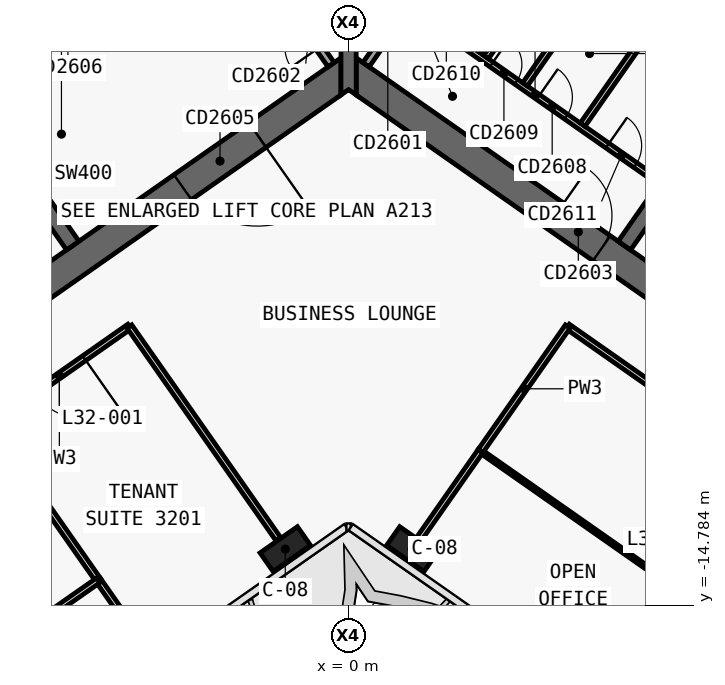
"""IFC4 building model, lengths in metres.
Left out: names, types, materials, properties, quantities, classifications, styles, units other than length and angle.
Written with IfcOpenShell. Run it as: python <this file> out.ifc"""

import sys

from ifc_helpers import new_model, si_unit, direction, frame, frame_2d, origin, origin_2d, place, context, subcontext, project, spatial, polyline, rectangle, outline, extrude, element, fill, save


model = new_model("IFC4")
c1 = context("Model", 3, precision=1e-05, world=origin(), true_north=direction((0.0, 1.0)))
c2 = subcontext(c1, "Body", "Model", "MODEL_VIEW")
j1 = project(units=[si_unit("LENGTHUNIT", "METRE"), si_unit("PLANEANGLEUNIT", "RADIAN")], contexts=[c1])
p1 = place(None, origin())
s1 = spatial("IfcSite", under=j1, at=p1, CompositionType="ELEMENT")
p2 = place(p1, origin())
s2 = spatial("IfcBuilding", under=s1, at=p2, CompositionType="ELEMENT")
p3 = place(p2, frame((0.0, 0.0, 143.7)))
s3 = spatial("IfcBuildingStorey", under=s2, at=p3, CompositionType="ELEMENT", Elevation=143.7)
p4 = place(p3, frame((0.029, 11.984, 0.0), z_axis=(0.0, 0.0, 1.0), x_axis=(-0.819151382952, -0.573577380837, 0.0)))
e1 = element("IfcWall", 1, at=p4, inside=s3, PredefinedType="SHEAR", context=c2, shape_type="SweptSolid", body=[
    extrude(outline(polyline([(33.898, 0.4), (0.56, 0.4), (-0.0, -0.4), (33.898, -0.4), (33.898, 0.4)])), origin(), (0.0, 0.0, 1.0), 3.9),
])
p5 = place(p3, frame((0.029, -0.712, 0.0), z_axis=(0.0, 0.0, 1.0), x_axis=(-0.819151758019, -0.573576845187, 0.0)))
e2 = element("IfcWall", 2, at=p5, inside=s3, PredefinedType="SHEAR", context=c2, shape_type="SweptSolid", body=[
    extrude(outline(polyline([(26.616, 0.4), (0.56, 0.4), (-0.0, -0.4), (26.616, -0.4), (26.616, 0.4)])), origin(), (0.0, 0.0, 1.0), 3.9),
])
p6 = place(p5, frame((2.966, 0.0, 0.0)))
e3 = element("IfcOpeningElement", 3, at=p6, cuts=e2, PredefinedType="OPENING", context=c2, shape_type="SweptSolid", body=[
    extrude(rectangle(XDim=2.4, YDim=2.1, at=frame_2d((1.2, 1.05))), frame((0.0, 0.41, 0.0), z_axis=(0.0, -1.0, 0.0), x_axis=(1.0, 0.0, 0.0)), (0.0, 0.0, 1.0), 0.82),
])
p7 = place(p5, frame((11.916, 0.0, 0.0)))
e4 = element("IfcOpeningElement", 4, at=p7, cuts=e2, PredefinedType="OPENING", context=c2, shape_type="SweptSolid", body=[
    extrude(rectangle(XDim=2.4, YDim=2.1, at=frame_2d((1.2, 1.05))), frame((0.0, 0.41, 0.0), z_axis=(0.0, -1.0, 0.0), x_axis=(1.0, 0.0, 0.0)), (0.0, 0.0, 1.0), 0.82),
])
p8 = place(p3, frame((-7.258, -5.326, 0.0), z_axis=(0.0, 0.0, 1.0), x_axis=(-0.573540709186, 0.819177059558, 0.0)))
e5 = element("IfcWall", 5, at=p8, inside=s3, PredefinedType="SHEAR", context=c2, shape_type="SweptSolid", body=[
    extrude(outline(polyline([(4.6, 0.2), (-0.0, 0.2), (-0.0, -0.2), (4.6, -0.2), (4.6, 0.2)])), origin(), (0.0, 0.0, 1.0), 3.9),
])
p9 = place(p3, frame((-2.638, 3.768, 0.0), z_axis=(0.0, 0.0, 1.0), x_axis=(-0.81915267502, -0.573575535572, 0.0)))
e6 = element("IfcWall", 6, at=p9, inside=s3, PredefinedType="SHEAR", context=c2, shape_type="SweptSolid", body=[
    extrude(outline(polyline([(26.2, 0.2), (0.0, 0.2), (0.0, -0.2), (26.2, -0.2), (26.2, 0.2)])), origin(), (0.0, 0.0, 1.0), 3.9),
])
p10 = place(p9, frame((1.169, 0.0, 0.0)))
e7 = element("IfcOpeningElement", 7, at=p10, cuts=e6, PredefinedType="OPENING", context=c2, shape_type="SweptSolid", body=[
    extrude(rectangle(XDim=1.1, YDim=2.1, at=frame_2d((0.55, 1.05))), frame((0.0, 0.21, 0.0), z_axis=(0.0, -1.0, 0.0), x_axis=(1.0, 0.0, 0.0)), (0.0, 0.0, 1.0), 0.42),
])
p11 = place(p9, frame((3.206, 0.0, 0.0)))
e8 = element("IfcOpeningElement", 8, at=p11, cuts=e6, PredefinedType="OPENING", context=c2, shape_type="SweptSolid", body=[
    extrude(rectangle(XDim=1.1, YDim=2.1, at=frame_2d((0.55, 1.05))), frame((0.0, 0.21, 0.0), z_axis=(0.0, -1.0, 0.0), x_axis=(1.0, 0.0, 0.0)), (0.0, 0.0, 1.0), 0.42),
])
p12 = place(p9, frame((5.244, 0.0, 0.0)))
e9 = element("IfcOpeningElement", 9, at=p12, cuts=e6, PredefinedType="OPENING", context=c2, shape_type="SweptSolid", body=[
    extrude(rectangle(XDim=1.1, YDim=2.1, at=frame_2d((0.55, 1.05))), frame((0.0, 0.21, 0.0), z_axis=(0.0, -1.0, 0.0), x_axis=(1.0, 0.0, 0.0)), (0.0, 0.0, 1.0), 0.42),
])
p13 = place(p9, frame((7.281, 0.0, 0.0)))
e10 = element("IfcOpeningElement", 10, at=p13, cuts=e6, PredefinedType="OPENING", context=c2, shape_type="SweptSolid", body=[
    extrude(rectangle(XDim=1.1, YDim=2.1, at=frame_2d((0.55, 1.05))), frame((0.0, 0.21, 0.0), z_axis=(0.0, -1.0, 0.0), x_axis=(1.0, 0.0, 0.0)), (0.0, 0.0, 1.0), 0.42),
])
p14 = place(p9, frame((9.688, 0.0, 0.0)))
e11 = element("IfcOpeningElement", 11, at=p14, cuts=e6, PredefinedType="OPENING", context=c2, shape_type="SweptSolid", body=[
    extrude(rectangle(XDim=1.1, YDim=2.1, at=frame_2d((0.55, 1.05))), frame((0.0, 0.21, 0.0), z_axis=(0.0, -1.0, 0.0), x_axis=(1.0, 0.0, 0.0)), (0.0, 0.0, 1.0), 0.42),
])
p15 = place(p9, frame((11.863, 0.0, 0.0)))
e12 = element("IfcOpeningElement", 12, at=p15, cuts=e6, PredefinedType="OPENING", context=c2, shape_type="SweptSolid", body=[
    extrude(rectangle(XDim=1.1, YDim=2.1, at=frame_2d((0.55, 1.05))), frame((0.0, 0.21, 0.0), z_axis=(0.0, -1.0, 0.0), x_axis=(1.0, 0.0, 0.0)), (0.0, 0.0, 1.0), 0.42),
])
p16 = place(p9, frame((14.038, 0.0, 0.0)))
e13 = element("IfcOpeningElement", 13, at=p16, cuts=e6, PredefinedType="OPENING", context=c2, shape_type="SweptSolid", body=[
    extrude(rectangle(XDim=1.1, YDim=2.1, at=frame_2d((0.55, 1.05))), frame((0.0, 0.21, 0.0), z_axis=(0.0, -1.0, 0.0), x_axis=(1.0, 0.0, 0.0)), (0.0, 0.0, 1.0), 0.42),
])
p17 = place(p9, frame((16.212, 0.0, 0.0)))
e14 = element("IfcOpeningElement", 14, at=p17, cuts=e6, PredefinedType="OPENING", context=c2, shape_type="SweptSolid", body=[
    extrude(rectangle(XDim=1.1, YDim=2.1, at=frame_2d((0.55, 1.05))), frame((0.0, 0.21, 0.0), z_axis=(0.0, -1.0, 0.0), x_axis=(1.0, 0.0, 0.0)), (0.0, 0.0, 1.0), 0.42),
])
p18 = place(p3, frame((-0.029, 11.984, 0.0), z_axis=(0.0, 0.0, 1.0), x_axis=(0.819151382952, -0.573577380837, 0.0)))
e15 = element("IfcWall", 15, at=p18, inside=s3, PredefinedType="SHEAR", context=c2, shape_type="SweptSolid", body=[
    extrude(outline(polyline([(33.898, 0.4), (-0.0, 0.4), (0.56, -0.4), (33.898, -0.4), (33.898, 0.4)])), origin(), (0.0, 0.0, 1.0), 3.9),
])
p19 = place(p3, frame((-0.029, -0.712, 0.0), z_axis=(0.0, 0.0, 1.0), x_axis=(0.819151758019, -0.573576845187, 0.0)))
e16 = element("IfcWall", 16, at=p19, inside=s3, PredefinedType="SHEAR", context=c2, shape_type="SweptSolid", body=[
    extrude(outline(polyline([(26.616, 0.4), (-0.0, 0.4), (0.56, -0.4), (26.616, -0.4), (26.616, 0.4)])), origin(), (0.0, 0.0, 1.0), 3.9),
])
p20 = place(p19, frame((6.666, 0.0, 0.0)))
e17 = element("IfcOpeningElement", 17, at=p20, cuts=e16, PredefinedType="OPENING", context=c2, shape_type="SweptSolid", body=[
    extrude(rectangle(XDim=1.5, YDim=2.1, at=frame_2d((0.75, 1.05))), frame((0.0, 0.41, 0.0), z_axis=(0.0, -1.0, 0.0), x_axis=(1.0, 0.0, 0.0)), (0.0, 0.0, 1.0), 0.82),
])
p21 = place(p19, frame((12.366, 0.0, 0.0)))
e18 = element("IfcOpeningElement", 18, at=p21, cuts=e16, PredefinedType="OPENING", context=c2, shape_type="SweptSolid", body=[
    extrude(rectangle(XDim=1.5, YDim=2.1, at=frame_2d((0.75, 1.05))), frame((0.0, 0.41, 0.0), z_axis=(0.0, -1.0, 0.0), x_axis=(1.0, 0.0, 0.0)), (0.0, 0.0, 1.0), 0.82),
])
p22 = place(p3, frame((7.258, -5.326, 0.0), z_axis=(0.0, 0.0, 1.0), x_axis=(0.573540709186, 0.819177059558, 0.0)))
e19 = element("IfcWall", 19, at=p22, inside=s3, PredefinedType="SHEAR", context=c2, shape_type="SweptSolid", body=[
    extrude(outline(polyline([(-0.0, 0.2), (-0.0, -0.2), (4.6, -0.2), (4.6, 0.2), (-0.0, 0.2)])), origin(), (0.0, 0.0, 1.0), 3.9),
])
p23 = place(p3, frame((2.638, 3.768, 0.0), z_axis=(0.0, 0.0, 1.0), x_axis=(0.81915267502, -0.573575535572, 0.0)))
e20 = element("IfcWall", 20, at=p23, inside=s3, PredefinedType="SHEAR", context=c2, shape_type="SweptSolid", body=[
    extrude(outline(polyline([(0.0, 0.2), (0.0, -0.2), (26.2, -0.2), (26.2, 0.2), (0.0, 0.2)])), origin(), (0.0, 0.0, 1.0), 3.9),
])
p24 = place(p23, frame((9.637, 0.0, 0.0)))
e21 = element("IfcOpeningElement", 21, at=p24, cuts=e20, PredefinedType="OPENING", context=c2, shape_type="SweptSolid", body=[
    extrude(rectangle(XDim=1.2, YDim=2.1, at=frame_2d((0.6, 1.05))), frame((0.0, 0.21, 0.0), z_axis=(0.0, -1.0, 0.0), x_axis=(1.0, 0.0, 0.0)), (0.0, 0.0, 1.0), 0.42),
])
p25 = place(p23, frame((11.812, 0.0, 0.0)))
e22 = element("IfcOpeningElement", 22, at=p25, cuts=e20, PredefinedType="OPENING", context=c2, shape_type="SweptSolid", body=[
    extrude(rectangle(XDim=1.2, YDim=2.1, at=frame_2d((0.6, 1.05))), frame((0.0, 0.21, 0.0), z_axis=(0.0, -1.0, 0.0), x_axis=(1.0, 0.0, 0.0)), (0.0, 0.0, 1.0), 0.42),
])
p26 = place(p23, frame((13.988, 0.0, 0.0)))
e23 = element("IfcOpeningElement", 23, at=p26, cuts=e20, PredefinedType="OPENING", context=c2, shape_type="SweptSolid", body=[
    extrude(rectangle(XDim=1.2, YDim=2.1, at=frame_2d((0.6, 1.05))), frame((0.0, 0.21, 0.0), z_axis=(0.0, -1.0, 0.0), x_axis=(1.0, 0.0, 0.0)), (0.0, 0.0, 1.0), 0.42),
])
p27 = place(p23, frame((16.262, 0.0, 0.0)))
e24 = element("IfcOpeningElement", 24, at=p27, cuts=e20, PredefinedType="OPENING", context=c2, shape_type="SweptSolid", body=[
    extrude(rectangle(XDim=1.0, YDim=2.1, at=frame_2d((0.5, 1.05))), frame((0.0, 0.21, 0.0), z_axis=(0.0, -1.0, 0.0), x_axis=(1.0, 0.0, 0.0)), (0.0, 0.0, 1.0), 0.42),
])
p28 = place(p3, frame((0.0, -1.361, 0.0), z_axis=(0.0, 0.0, 1.0), x_axis=(0.0, 1.0, 0.0)))
e25 = element("IfcWall", 25, at=p28, inside=s3, PredefinedType="SHEAR", context=c2, shape_type="SweptSolid", body=[
    extrude(outline(polyline([(0.0, -0.2), (0.14, -0.2), (1.075, -0.2), (12.696, -0.2), (13.813, -0.2), (13.893, -0.2), (13.933, -0.172), (13.813, 0.0), (13.933, 0.172), (13.893, 0.2), (13.813, 0.2), (12.696, 0.2), (1.075, 0.2), (0.14, 0.2), (0.0, 0.2), (0.14, 0.0), (0.0, -0.2)])), origin(), (0.0, 0.0, 1.0), 3.9),
])
for number, where, z_axis, x_axis in (
    (26, (-1.665, -13.313, 0.0), (0.0, 0.0, 1.0), (-0.819, -0.574, 0.0)),
    (27, (1.665, -13.313, 0.0), (0.0, 0.0, 1.0), (0.819, -0.574, 0.0)),
):
    element("IfcColumn", number, at=place(p3, frame(where, z_axis=z_axis, x_axis=x_axis)), inside=s3, PredefinedType="COLUMN", context=c2, shape_type="SweptSolid", body=[
        extrude(rectangle(XDim=1.2, YDim=0.6, at=origin_2d()), origin(), (0.0, 0.0, 1.0), 3.9),
    ])
p29 = place(p3, frame((1.63, 0.934, 0.0), z_axis=(0.0, 0.0, 1.0), x_axis=(0.819165963305, -0.573556557423, 0.0)))
e28 = element("IfcWall", 28, at=p29, inside=s3, PredefinedType="PARTITIONING", context=c2, shape_type="SweptSolid", body=[
    extrude(rectangle(XDim=8.0, YDim=0.15, at=frame_2d((4.0, 0.0))), origin(), (0.0, 0.0, 1.0), 3.62),
])
p30 = place(p29, frame((0.7, 0.0, 0.0)))
e29 = element("IfcOpeningElement", 29, at=p30, cuts=e28, PredefinedType="OPENING", context=c2, shape_type="SweptSolid", body=[
    extrude(rectangle(XDim=0.9, YDim=2.1, at=frame_2d((0.45, 1.05))), frame((0.0, 0.085, 0.0), z_axis=(0.0, -1.0, 0.0), x_axis=(1.0, 0.0, 0.0)), (0.0, 0.0, 1.0), 0.17),
])
p31 = place(p29, frame((2.6, 0.0, 0.0)))
e30 = element("IfcOpeningElement", 30, at=p31, cuts=e28, PredefinedType="OPENING", context=c2, shape_type="SweptSolid", body=[
    extrude(rectangle(XDim=0.8, YDim=2.1, at=frame_2d((0.4, 1.05))), frame((0.0, 0.085, 0.0), z_axis=(0.0, -1.0, 0.0), x_axis=(1.0, 0.0, 0.0)), (0.0, 0.0, 1.0), 0.17),
])
p32 = place(p29, frame((4.1, 0.0, 0.0)))
e31 = element("IfcOpeningElement", 31, at=p32, cuts=e28, PredefinedType="OPENING", context=c2, shape_type="SweptSolid", body=[
    extrude(rectangle(XDim=0.9, YDim=2.1, at=frame_2d((0.45, 1.05))), frame((0.0, 0.085, 0.0), z_axis=(0.0, -1.0, 0.0), x_axis=(1.0, 0.0, 0.0)), (0.0, 0.0, 1.0), 0.17),
])
p33 = place(p29, frame((6.325, 0.0, 0.0)))
e32 = element("IfcOpeningElement", 32, at=p33, cuts=e28, PredefinedType="OPENING", context=c2, shape_type="SweptSolid", body=[
    extrude(rectangle(XDim=0.9, YDim=2.1, at=frame_2d((0.45, 1.05))), frame((0.0, 0.085, 0.0), z_axis=(0.0, -1.0, 0.0), x_axis=(1.0, 0.0, 0.0)), (0.0, 0.0, 1.0), 0.17),
])
for number, where, z_axis, x_axis in (
    (33, (3.619, -0.367, 0.0), (0.0, 0.0, 1.0), (0.574, 0.819, 0.0)),
    (34, (4.643, -1.084, 0.0), (0.0, 0.0, 1.0), (0.574, 0.819, 0.0)),
    (35, (6.158, -2.145, 0.0), (0.0, 0.0, 1.0), (0.574, 0.819, 0.0)),
):
    element("IfcWall", number, at=place(p3, frame(where, z_axis=z_axis, x_axis=x_axis)), inside=s3, PredefinedType="PARTITIONING", context=c2, shape_type="SweptSolid", body=[
        extrude(rectangle(XDim=2.625, YDim=0.15, at=frame_2d((1.312, 0.0))), origin(), (0.0, 0.0, 1.0), 3.62),
    ])
p34 = place(p3, frame((-0.459, -0.565, 0.0), z_axis=(0.0, 0.0, 1.0), x_axis=(-0.573576324356, 0.819152122709, 0.0)))
e36 = element("IfcWall", 36, at=p34, inside=s3, PredefinedType="SOLIDWALL", context=c2, shape_type="SweptSolid", body=[
    extrude(rectangle(XDim=4.6, YDim=0.2, at=frame_2d((2.3, 0.0))), origin(), (0.0, 0.0, 1.0), 3.62),
])
p35 = place(p34, frame((0.55, 0.0, 0.0)))
e37 = element("IfcOpeningElement", 37, at=p35, cuts=e36, PredefinedType="OPENING", context=c2, shape_type="SweptSolid", body=[
    extrude(rectangle(XDim=0.9, YDim=2.1, at=frame_2d((0.45, 1.05))), frame((0.0, 0.11, 0.0), z_axis=(0.0, -1.0, 0.0), x_axis=(1.0, 0.0, 0.0)), (0.0, 0.0, 1.0), 0.22),
])
p36 = place(p3, frame((0.459, -0.565, 0.0), z_axis=(0.0, 0.0, 1.0), x_axis=(0.573576324356, 0.819152122709, 0.0)))
e38 = element("IfcWall", 38, at=p36, inside=s3, PredefinedType="SOLIDWALL", context=c2, shape_type="SweptSolid", body=[
    extrude(rectangle(XDim=4.6, YDim=0.2, at=frame_2d((2.3, 0.0))), origin(), (0.0, 0.0, 1.0), 3.62),
])
p37 = place(p36, frame((0.55, 0.0, 0.0)))
e39 = element("IfcOpeningElement", 39, at=p37, cuts=e38, PredefinedType="OPENING", context=c2, shape_type="SweptSolid", body=[
    extrude(rectangle(XDim=0.9, YDim=2.1, at=frame_2d((0.45, 1.05))), frame((0.0, 0.11, 0.0), z_axis=(0.0, -1.0, 0.0), x_axis=(1.0, 0.0, 0.0)), (0.0, 0.0, 1.0), 0.22),
])
p38 = place(p3, frame((15.598, -14.34, 0.0), z_axis=(0.0, 0.0, 1.0), x_axis=(-0.81915546166, 0.573571555809, 0.0)))
e40 = element("IfcWall", 40, at=p38, inside=s3, PredefinedType="PARTITIONING", context=c2, shape_type="SweptSolid", body=[
    extrude(rectangle(XDim=12.002, YDim=0.15, at=frame_2d((6.001, 0.0))), origin(), (0.0, 0.0, 1.0), 3.0),
])
p39 = place(p38, frame((5.201, 0.0, 0.0)))
e41 = element("IfcOpeningElement", 41, at=p39, cuts=e40, PredefinedType="OPENING", context=c2, shape_type="SweptSolid", body=[
    extrude(rectangle(XDim=1.6, YDim=2.1, at=frame_2d((0.8, 1.05))), frame((0.0, 0.085, 0.0), z_axis=(0.0, -1.0, 0.0), x_axis=(1.0, 0.0, 0.0)), (0.0, 0.0, 1.0), 0.17),
])
p40 = place(p3, frame((-5.766, -7.456, 0.0), z_axis=(0.0, 0.0, 1.0), x_axis=(-0.819142740634, -0.573589723117, 0.0)))
e42 = element("IfcWall", 42, at=p40, inside=s3, PredefinedType="PARTITIONING", context=c2, shape_type="SweptSolid", body=[
    extrude(rectangle(XDim=4.502, YDim=0.15, at=frame_2d((2.251, 0.0))), origin(), (0.0, 0.0, 1.0), 3.0),
])
p41 = place(p40, frame((1.451, 0.0, 0.0)))
e43 = element("IfcOpeningElement", 43, at=p41, cuts=e42, PredefinedType="OPENING", context=c2, shape_type="SweptSolid", body=[
    extrude(rectangle(XDim=1.6, YDim=2.1, at=frame_2d((0.8, 1.05))), frame((0.0, 0.085, 0.0), z_axis=(0.0, -1.0, 0.0), x_axis=(1.0, 0.0, 0.0)), (0.0, 0.0, 1.0), 0.17),
])
p42 = place(p3, frame((13.301, -17.616, 0.0), z_axis=(0.0, 0.0, 1.0), x_axis=(-0.819146845232, 0.573583861302, 0.0)))
e44 = element("IfcWall", 44, at=p42, inside=s3, PredefinedType="PARTITIONING", context=c2, shape_type="SweptSolid", body=[
    extrude(rectangle(XDim=12.0, YDim=0.1, at=frame_2d((6.0, 0.0))), origin(), (0.0, 0.0, 1.0), 3.0),
])
p43 = place(p42, frame((5.55, 0.0, 0.0)))
e45 = element("IfcOpeningElement", 45, at=p43, cuts=e44, PredefinedType="OPENING", context=c2, shape_type="SweptSolid", body=[
    extrude(rectangle(XDim=0.9, YDim=2.1, at=frame_2d((0.45, 1.05))), frame((0.0, 0.06, 0.0), z_axis=(0.0, -1.0, 0.0), x_axis=(1.0, 0.0, 0.0)), (0.0, 0.0, 1.0), 0.12),
])
p44 = place(p3, frame((1.849, -13.051, 0.0), z_axis=(0.0, 0.0, 1.0), x_axis=(0.573555012677, 0.819167044889, 0.0)))
e46 = element("IfcWall", 46, at=p44, inside=s3, PredefinedType="PARTITIONING", context=c2, shape_type="SweptSolid", body=[
    extrude(rectangle(XDim=2.829, YDim=0.15, at=frame_2d((1.415, 0.0))), origin(), (0.0, 0.0, 1.0), 3.0),
])
p45 = place(p3, frame((3.472, -10.732, 0.0), z_axis=(0.0, 0.0, 1.0), x_axis=(0.573597512525, 0.819137286189, 0.0)))
e47 = element("IfcWall", 47, at=p45, inside=s3, PredefinedType="PARTITIONING", context=c2, shape_type="SweptSolid", body=[
    extrude(rectangle(XDim=4.0, YDim=0.15, at=frame_2d((2.0, 0.0))), origin(), (0.0, 0.0, 1.0), 3.0),
])
p46 = place(p3, frame((-1.849, -13.051, 0.0), z_axis=(0.0, 0.0, 1.0), x_axis=(-0.57357985571, 0.819149650018, 0.0)))
e48 = element("IfcWall", 48, at=p46, inside=s3, PredefinedType="PARTITIONING", context=c2, shape_type="SweptSolid", body=[
    extrude(rectangle(XDim=6.832, YDim=0.15, at=frame_2d((3.416, 0.0))), origin(), (0.0, 0.0, 1.0), 3.0),
])
p47 = place(p3, frame((-6.583, -14.134, 0.0), z_axis=(0.0, 0.0, 1.0), x_axis=(-0.573557338351, 0.819165416521, 0.0)))
e49 = element("IfcWall", 49, at=p47, inside=s3, PredefinedType="PARTITIONING", context=c2, shape_type="SweptSolid", body=[
    extrude(rectangle(XDim=5.002, YDim=0.15, at=frame_2d((2.501, 0.0))), origin(), (0.0, 0.0, 1.0), 3.62),
])
p48 = place(p3, frame((-5.151, -16.18, 0.0), z_axis=(0.0, 0.0, 1.0), x_axis=(-0.573613022702, 0.819126425033, 0.0)))
e50 = element("IfcWall", 50, at=p48, inside=s3, PredefinedType="PARTITIONING", context=c2, shape_type="SweptSolid", body=[
    extrude(rectangle(XDim=2.501, YDim=0.15, at=frame_2d((1.25, 0.0))), origin(), (0.0, 0.0, 1.0), 2.9),
])
p49 = place(p3, frame((-6.585, -14.133, 0.0), z_axis=(0.0, 0.0, 1.0), x_axis=(-0.819156404271, -0.573570209602, 0.0)))
e51 = element("IfcWall", 51, at=p49, inside=s3, PredefinedType="PARTITIONING", context=c2, shape_type="SweptSolid", body=[
    extrude(rectangle(XDim=12.0, YDim=0.15, at=frame_2d((6.0, 0.0))), origin(), (0.0, 0.0, 1.0), 3.0),
])
p50 = place(p6, origin())
e52 = element("IfcDoor", 52, at=p50, inside=s3, OperationType="DOUBLE_DOOR_SINGLE_SWING", PredefinedType="DOOR", context=c2, shape_type="SweptSolid", body=[
    extrude(rectangle(XDim=2.4, YDim=2.1, at=frame_2d((1.2, 1.05))), frame((0.0, 0.025, 0.0), z_axis=(0.0, -1.0, 0.0), x_axis=(1.0, 0.0, 0.0)), (0.0, 0.0, 1.0), 0.05),
])
fill(e3, e52)
p51 = place(p31, origin())
e53 = element("IfcDoor", 53, at=p51, inside=s3, OperationType="SINGLE_SWING_RIGHT", PredefinedType="DOOR", context=c2, shape_type="SweptSolid", body=[
    extrude(rectangle(XDim=0.8, YDim=2.1, at=frame_2d((0.4, 1.05))), frame((0.0, 0.025, 0.0), z_axis=(0.0, -1.0, 0.0), x_axis=(1.0, 0.0, 0.0)), (0.0, 0.0, 1.0), 0.05),
])
fill(e30, e53)
p52 = place(p32, origin())
e54 = element("IfcDoor", 54, at=p52, inside=s3, OperationType="SINGLE_SWING_RIGHT", PredefinedType="DOOR", context=c2, shape_type="SweptSolid", body=[
    extrude(rectangle(XDim=0.9, YDim=2.1, at=frame_2d((0.45, 1.05))), frame((0.0, 0.025, 0.0), z_axis=(0.0, -1.0, 0.0), x_axis=(1.0, 0.0, 0.0)), (0.0, 0.0, 1.0), 0.05),
])
fill(e31, e54)
p53 = place(p33, origin())
e55 = element("IfcDoor", 55, at=p53, inside=s3, OperationType="SINGLE_SWING_RIGHT", PredefinedType="DOOR", context=c2, shape_type="SweptSolid", body=[
    extrude(rectangle(XDim=0.9, YDim=2.1, at=frame_2d((0.45, 1.05))), frame((0.0, 0.025, 0.0), z_axis=(0.0, -1.0, 0.0), x_axis=(1.0, 0.0, 0.0)), (0.0, 0.0, 1.0), 0.05),
])
fill(e32, e55)
p54 = place(p20, origin())
e56 = element("IfcDoor", 56, at=p54, inside=s3, OperationType="SINGLE_SWING_RIGHT", PredefinedType="DOOR", context=c2, shape_type="SweptSolid", body=[
    extrude(rectangle(XDim=1.5, YDim=2.1, at=frame_2d((0.75, 1.05))), frame((0.0, 0.025, 0.0), z_axis=(0.0, -1.0, 0.0), x_axis=(1.0, 0.0, 0.0)), (0.0, 0.0, 1.0), 0.05),
])
fill(e17, e56)
p55 = place(p41, origin())
e57 = element("IfcDoor", 57, at=p55, inside=s3, OperationType="DOUBLE_DOOR_SINGLE_SWING", PredefinedType="DOOR", context=c2, shape_type="SweptSolid", body=[
    extrude(rectangle(XDim=1.6, YDim=2.1, at=frame_2d((0.8, 1.05))), frame((0.0, 0.025, 0.0), z_axis=(0.0, -1.0, 0.0), x_axis=(1.0, 0.0, 0.0)), (0.0, 0.0, 1.0), 0.05),
])
fill(e43, e57)
save(model, sys.argv[1])
